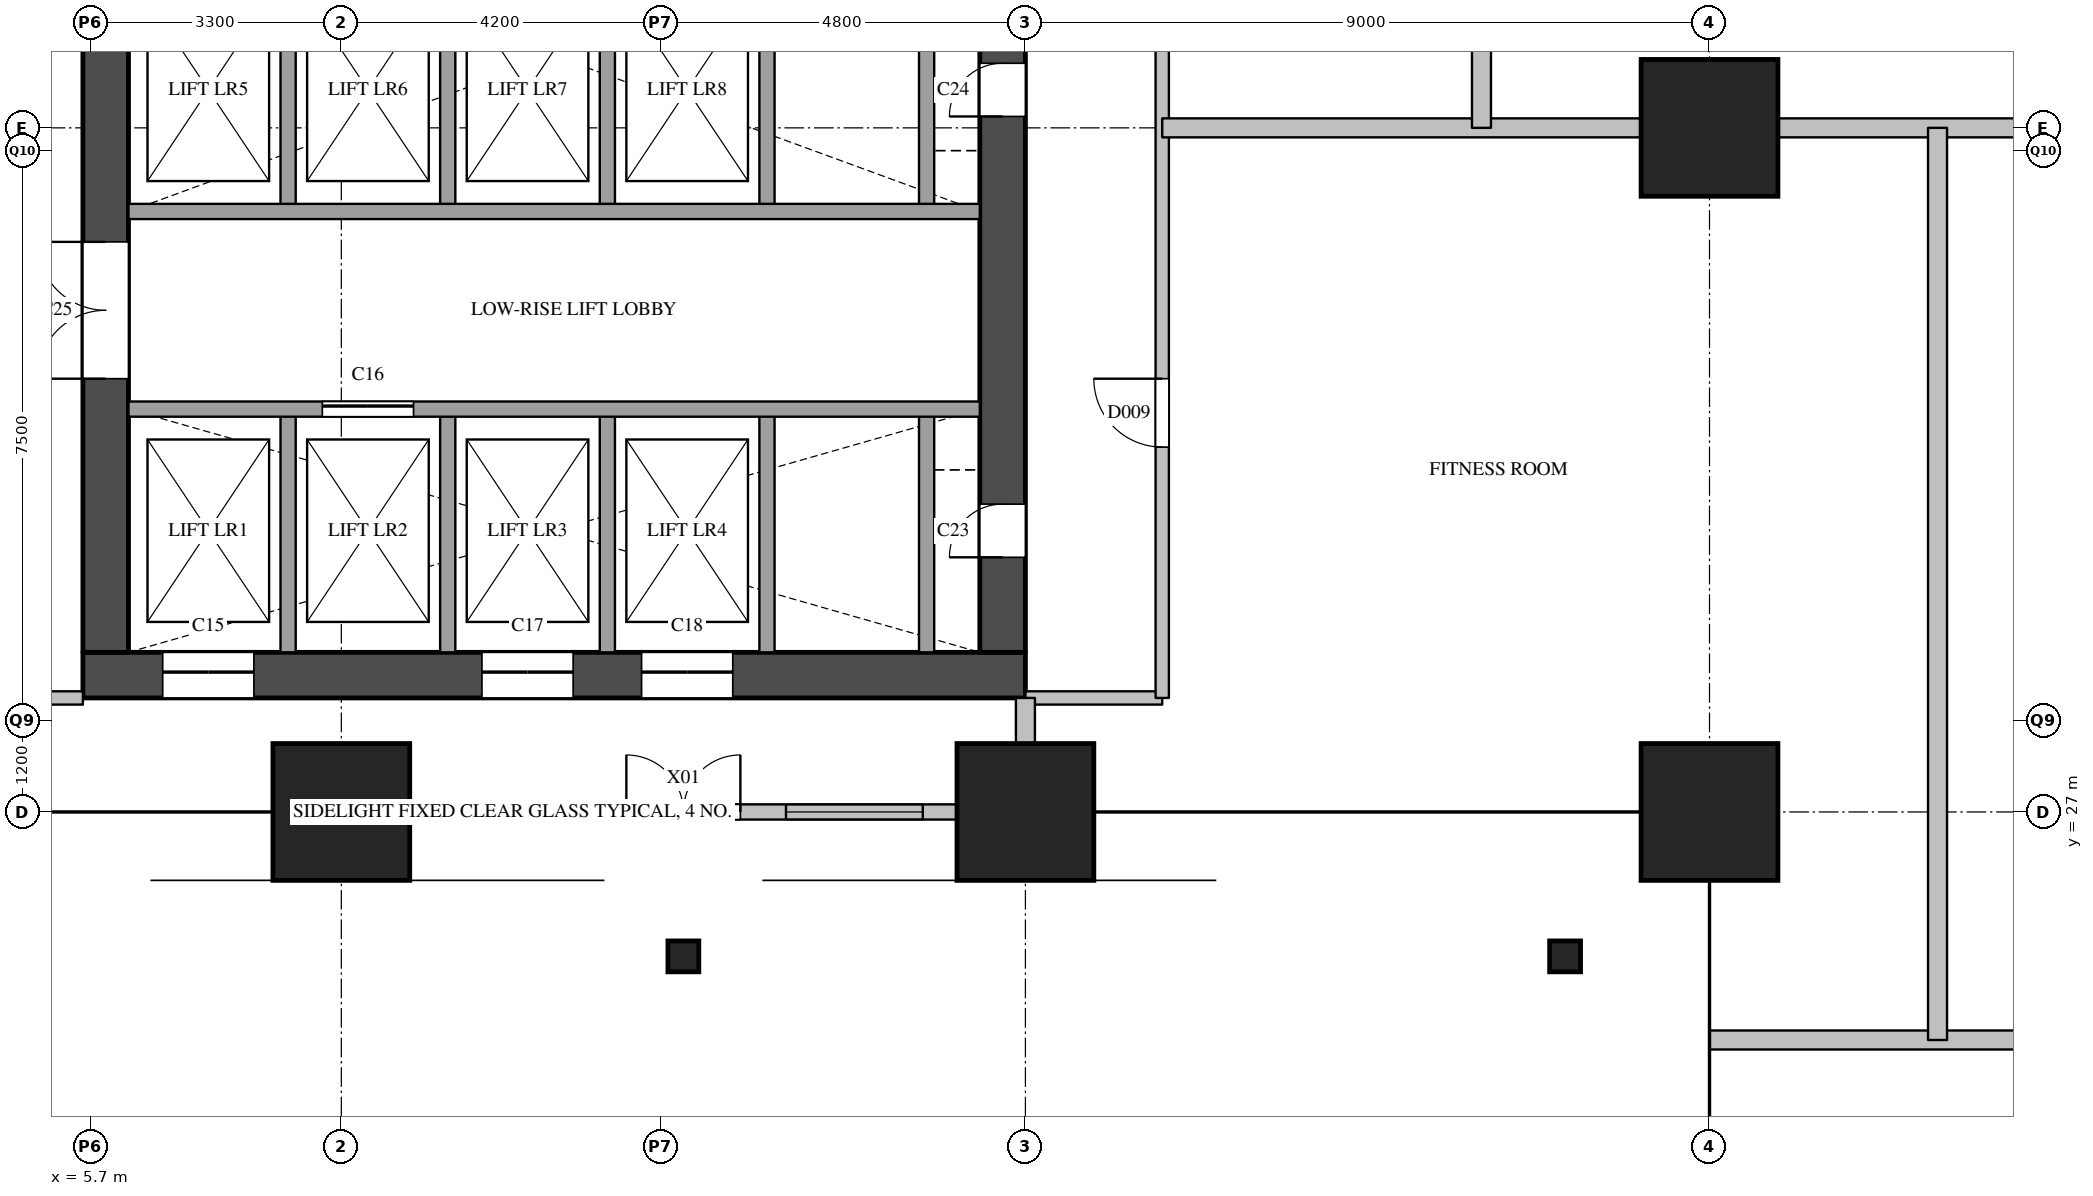
"""IFC4 building model, lengths in metres.
Left out: names, types, materials, properties, quantities, classifications, styles, units other than length and angle.
Written with IfcOpenShell. Run it as: python <this file> out.ifc"""

import sys

from ifc_helpers import new_model, si_unit, direction, frame, frame_2d, origin, origin_2d, place, context, subcontext, project, spatial, rectangle, hollow_rectangle, extrude, element, fill, save


model = new_model("IFC4")
c1 = context("Model", 3, precision=1e-05, world=origin(), true_north=direction((0.0, 1.0)))
c2 = subcontext(c1, "Body", "Model", "MODEL_VIEW")
j1 = project(units=[si_unit("LENGTHUNIT", "METRE"), si_unit("PLANEANGLEUNIT", "RADIAN")], contexts=[c1])
p1 = place(None, origin())
s1 = spatial("IfcSite", under=j1, at=p1, CompositionType="ELEMENT")
p2 = place(p1, origin())
s2 = spatial("IfcBuilding", under=s1, at=p2, CompositionType="ELEMENT")
p3 = place(p2, frame((0.0, 0.0, 77.8)))
s3 = spatial("IfcBuildingStorey", under=s2, at=p3, CompositionType="ELEMENT", Elevation=77.8)
for number, where, z_axis, x_axis in (
    (1, (9.0, 27.0, 0.0), (0.0, 0.0, 1.0), (1.0, 0.0, 0.0)),
    (2, (18.0, 27.0, 0.0), (0.0, 0.0, 1.0), (1.0, 0.0, 0.0)),
    (3, (27.0, 27.0, 0.0), (0.0, 0.0, 1.0), (1.0, 0.0, 0.0)),
    (4, (27.0, 36.0, 0.0), (0.0, 0.0, 1.0), (1.0, 0.0, 0.0)),
):
    element("IfcColumn", number, at=place(p3, frame(where, z_axis=z_axis, x_axis=x_axis)), inside=s3, PredefinedType="COLUMN", context=c2, shape_type="SweptSolid", body=[
        extrude(rectangle(XDim=1.8, YDim=1.8, at=origin_2d()), origin(), (0.0, 0.0, 1.0), 3.8),
    ])
for number, where, z_axis, x_axis in (
    (5, (13.5, 25.1, 0.0), (0.0, 0.0, 1.0), (1.0, 0.0, 0.0)),
    (6, (25.1, 25.1, 0.0), (0.0, 0.0, 1.0), (1.0, 0.0, 0.0)),
):
    element("IfcColumn", number, at=place(p3, frame(where, z_axis=z_axis, x_axis=x_axis)), inside=s3, PredefinedType="COLUMN", context=c2, shape_type="SweptSolid", body=[
        extrude(hollow_rectangle(XDim=0.406, YDim=0.406, WallThickness=0.015, at=origin_2d()), origin(), (0.0, 0.0, 1.0), 8.467),
    ])
p4 = place(p3, frame((9.9, 27.0, 0.0), z_axis=(0.0, 0.0, 1.0), x_axis=(1.0, 0.0, 0.0)))
e7 = element("IfcWall", 7, at=p4, inside=s3, PredefinedType="SOLIDWALL", context=c2, shape_type="SweptSolid", body=[
    extrude(rectangle(XDim=7.2, YDim=0.2, at=frame_2d((3.6, 0.0))), origin(), (0.0, 0.0, 1.0), 2.5),
])
p5 = place(p4, frame((2.85, 0.0, 0.0)))
e8 = element("IfcOpeningElement", 8, at=p5, cuts=e7, PredefinedType="OPENING", context=c2, shape_type="SweptSolid", body=[
    extrude(rectangle(XDim=1.5, YDim=2.1, at=frame_2d((0.75, 1.05))), frame((0.0, 0.11, 0.0), z_axis=(0.0, -1.0, 0.0), x_axis=(1.0, 0.0, 0.0)), (0.0, 0.0, 1.0), 0.22),
])
p6 = place(p4, frame((0.45, 0.0, 0.1)))
e9 = element("IfcOpeningElement", 9, at=p6, cuts=e7, PredefinedType="OPENING", context=c2, shape_type="SweptSolid", body=[
    extrude(rectangle(XDim=1.8, YDim=2.1, at=frame_2d((0.9, 1.05))), frame((0.0, 0.11, 0.0), z_axis=(0.0, -1.0, 0.0), x_axis=(1.0, 0.0, 0.0)), (0.0, 0.0, 1.0), 0.22),
])
p7 = place(p4, frame((4.95, 0.0, 0.1)))
e10 = element("IfcOpeningElement", 10, at=p7, cuts=e7, PredefinedType="OPENING", context=c2, shape_type="SweptSolid", body=[
    extrude(rectangle(XDim=1.8, YDim=2.1, at=frame_2d((0.9, 1.05))), frame((0.0, 0.11, 0.0), z_axis=(0.0, -1.0, 0.0), x_axis=(1.0, 0.0, 0.0)), (0.0, 0.0, 1.0), 0.22),
])
p8 = place(p3, frame((5.6, 28.8, 0.0), z_axis=(0.0, 0.0, 1.0), x_axis=(1.0, 0.0, 0.0)))
e11 = element("IfcWall", 11, at=p8, inside=s3, PredefinedType="SHEAR", context=c2, shape_type="SweptSolid", body=[
    extrude(rectangle(XDim=12.4, YDim=0.6, at=frame_2d((6.2, 0.0))), origin(), (0.0, 0.0, 1.0), 3.5),
])
p9 = place(p8, frame((1.05, 0.0, 0.0)))
e12 = element("IfcOpeningElement", 12, at=p9, cuts=e11, PredefinedType="OPENING", context=c2, shape_type="SweptSolid", body=[
    extrude(rectangle(XDim=1.2, YDim=2.1, at=frame_2d((0.6, 1.05))), frame((0.0, 0.31, 0.0), z_axis=(0.0, -1.0, 0.0), x_axis=(1.0, 0.0, 0.0)), (0.0, 0.0, 1.0), 0.62),
])
p10 = place(p8, frame((5.25, 0.0, 0.0)))
e13 = element("IfcOpeningElement", 13, at=p10, cuts=e11, PredefinedType="OPENING", context=c2, shape_type="SweptSolid", body=[
    extrude(rectangle(XDim=1.2, YDim=2.1, at=frame_2d((0.6, 1.05))), frame((0.0, 0.31, 0.0), z_axis=(0.0, -1.0, 0.0), x_axis=(1.0, 0.0, 0.0)), (0.0, 0.0, 1.0), 0.62),
])
p11 = place(p8, frame((7.35, 0.0, 0.0)))
e14 = element("IfcOpeningElement", 14, at=p11, cuts=e11, PredefinedType="OPENING", context=c2, shape_type="SweptSolid", body=[
    extrude(rectangle(XDim=1.2, YDim=2.1, at=frame_2d((0.6, 1.05))), frame((0.0, 0.31, 0.0), z_axis=(0.0, -1.0, 0.0), x_axis=(1.0, 0.0, 0.0)), (0.0, 0.0, 1.0), 0.62),
])
p12 = place(p3, frame((5.9, 29.1, 0.0), z_axis=(0.0, 0.0, 1.0), x_axis=(0.0, 1.0, 0.0)))
e15 = element("IfcWall", 15, at=p12, inside=s3, PredefinedType="SHEAR", context=c2, shape_type="SweptSolid", body=[
    extrude(rectangle(XDim=20.3, YDim=0.6, at=frame_2d((10.15, 0.0))), origin(), (0.0, 0.0, 1.0), 3.5),
])
p13 = place(p12, frame((3.6, 0.0, 0.0)))
e16 = element("IfcOpeningElement", 16, at=p13, cuts=e15, PredefinedType="OPENING", context=c2, shape_type="SweptSolid", body=[
    extrude(rectangle(XDim=1.8, YDim=2.1, at=frame_2d((0.9, 1.05))), frame((0.0, 0.31, 0.0), z_axis=(0.0, -1.0, 0.0), x_axis=(1.0, 0.0, 0.0)), (0.0, 0.0, 1.0), 0.62),
])
p14 = place(p12, frame((16.4, 0.0, 0.0)))
e17 = element("IfcOpeningElement", 17, at=p14, cuts=e15, PredefinedType="OPENING", context=c2, shape_type="SweptSolid", body=[
    extrude(rectangle(XDim=1.0, YDim=2.1, at=frame_2d((0.5, 1.05))), frame((0.0, 0.31, 0.0), z_axis=(0.0, -1.0, 0.0), x_axis=(1.0, 0.0, 0.0)), (0.0, 0.0, 1.0), 0.62),
])
p15 = place(p3, frame((17.7, 29.1, 0.0), z_axis=(0.0, 0.0, 1.0), x_axis=(0.0, 1.0, 0.0)))
e18 = element("IfcWall", 18, at=p15, inside=s3, PredefinedType="SHEAR", context=c2, shape_type="SweptSolid", body=[
    extrude(rectangle(XDim=20.3, YDim=0.6, at=frame_2d((10.15, 0.0))), origin(), (0.0, 0.0, 1.0), 3.5),
])
p16 = place(p15, frame((1.25, 0.0, 0.0)))
e19 = element("IfcOpeningElement", 19, at=p16, cuts=e18, PredefinedType="OPENING", context=c2, shape_type="SweptSolid", body=[
    extrude(rectangle(XDim=0.7, YDim=2.1, at=frame_2d((0.35, 1.05))), frame((0.0, 0.31, 0.0), z_axis=(0.0, -1.0, 0.0), x_axis=(1.0, 0.0, 0.0)), (0.0, 0.0, 1.0), 0.62),
])
p17 = place(p15, frame((7.05, 0.0, 0.0)))
e20 = element("IfcOpeningElement", 20, at=p17, cuts=e18, PredefinedType="OPENING", context=c2, shape_type="SweptSolid", body=[
    extrude(rectangle(XDim=0.7, YDim=2.1, at=frame_2d((0.35, 1.05))), frame((0.0, 0.31, 0.0), z_axis=(0.0, -1.0, 0.0), x_axis=(1.0, 0.0, 0.0)), (0.0, 0.0, 1.0), 0.62),
])
p18 = place(p3, frame((8.3, 29.1, 0.0), z_axis=(0.0, 0.0, 1.0), x_axis=(0.0, 1.0, 0.0)))
e21 = element("IfcWall", 21, at=p18, inside=s3, PredefinedType="SOLIDWALL", context=c2, shape_type="SweptSolid", body=[
    extrude(rectangle(XDim=3.2, YDim=0.2, at=frame_2d((1.6, 0.0))), origin(), (0.0, 0.0, 1.0), 3.5),
])
p19 = place(p3, frame((8.3, 34.9, 0.0), z_axis=(0.0, 0.0, 1.0), x_axis=(0.0, 1.0, 0.0)))
e22 = element("IfcWall", 22, at=p19, inside=s3, PredefinedType="SOLIDWALL", context=c2, shape_type="SweptSolid", body=[
    extrude(rectangle(XDim=3.2, YDim=0.2, at=frame_2d((1.6, 0.0))), origin(), (0.0, 0.0, 1.0), 3.5),
])
p20 = place(p3, frame((10.4, 29.1, 0.0), z_axis=(0.0, 0.0, 1.0), x_axis=(0.0, 1.0, 0.0)))
e23 = element("IfcWall", 23, at=p20, inside=s3, PredefinedType="SOLIDWALL", context=c2, shape_type="SweptSolid", body=[
    extrude(rectangle(XDim=3.2, YDim=0.2, at=frame_2d((1.6, 0.0))), origin(), (0.0, 0.0, 1.0), 3.5),
])
p21 = place(p3, frame((10.4, 34.9, 0.0), z_axis=(0.0, 0.0, 1.0), x_axis=(0.0, 1.0, 0.0)))
e24 = element("IfcWall", 24, at=p21, inside=s3, PredefinedType="SOLIDWALL", context=c2, shape_type="SweptSolid", body=[
    extrude(rectangle(XDim=3.2, YDim=0.2, at=frame_2d((1.6, 0.0))), origin(), (0.0, 0.0, 1.0), 3.5),
])
p22 = place(p3, frame((12.5, 29.1, 0.0), z_axis=(0.0, 0.0, 1.0), x_axis=(0.0, 1.0, 0.0)))
e25 = element("IfcWall", 25, at=p22, inside=s3, PredefinedType="SOLIDWALL", context=c2, shape_type="SweptSolid", body=[
    extrude(rectangle(XDim=3.2, YDim=0.2, at=frame_2d((1.6, 0.0))), origin(), (0.0, 0.0, 1.0), 3.5),
])
p23 = place(p3, frame((12.5, 34.9, 0.0), z_axis=(0.0, 0.0, 1.0), x_axis=(0.0, 1.0, 0.0)))
e26 = element("IfcWall", 26, at=p23, inside=s3, PredefinedType="SOLIDWALL", context=c2, shape_type="SweptSolid", body=[
    extrude(rectangle(XDim=3.2, YDim=0.2, at=frame_2d((1.6, 0.0))), origin(), (0.0, 0.0, 1.0), 3.5),
])
p24 = place(p3, frame((14.6, 29.1, 0.0), z_axis=(0.0, 0.0, 1.0), x_axis=(0.0, 1.0, 0.0)))
e27 = element("IfcWall", 27, at=p24, inside=s3, PredefinedType="SOLIDWALL", context=c2, shape_type="SweptSolid", body=[
    extrude(rectangle(XDim=3.2, YDim=0.2, at=frame_2d((1.6, 0.0))), origin(), (0.0, 0.0, 1.0), 3.5),
])
p25 = place(p3, frame((14.6, 34.9, 0.0), z_axis=(0.0, 0.0, 1.0), x_axis=(0.0, 1.0, 0.0)))
e28 = element("IfcWall", 28, at=p25, inside=s3, PredefinedType="SOLIDWALL", context=c2, shape_type="SweptSolid", body=[
    extrude(rectangle(XDim=3.2, YDim=0.2, at=frame_2d((1.6, 0.0))), origin(), (0.0, 0.0, 1.0), 3.5),
])
p26 = place(p3, frame((16.7, 29.1, 0.0), z_axis=(0.0, 0.0, 1.0), x_axis=(0.0, 1.0, 0.0)))
e29 = element("IfcWall", 29, at=p26, inside=s3, PredefinedType="SOLIDWALL", context=c2, shape_type="SweptSolid", body=[
    extrude(rectangle(XDim=3.2, YDim=0.2, at=frame_2d((1.6, 0.0))), origin(), (0.0, 0.0, 1.0), 3.5),
])
p27 = place(p3, frame((16.7, 34.9, 0.0), z_axis=(0.0, 0.0, 1.0), x_axis=(0.0, 1.0, 0.0)))
e30 = element("IfcWall", 30, at=p27, inside=s3, PredefinedType="SOLIDWALL", context=c2, shape_type="SweptSolid", body=[
    extrude(rectangle(XDim=3.2, YDim=0.2, at=frame_2d((1.6, 0.0))), origin(), (0.0, 0.0, 1.0), 3.5),
])
p28 = place(p3, frame((6.2, 32.3, 0.0), z_axis=(0.0, 0.0, 1.0), x_axis=(1.0, 0.0, 0.0)))
e31 = element("IfcWall", 31, at=p28, inside=s3, PredefinedType="SOLIDWALL", context=c2, shape_type="SweptSolid", body=[
    extrude(rectangle(XDim=11.2, YDim=0.2, at=frame_2d((5.6, 0.0))), origin(), (0.0, 0.0, 1.0), 3.5),
])
p29 = place(p28, frame((2.55, 0.0, 0.0)))
e32 = element("IfcOpeningElement", 32, at=p29, cuts=e31, PredefinedType="OPENING", context=c2, shape_type="SweptSolid", body=[
    extrude(rectangle(XDim=1.2, YDim=2.1, at=frame_2d((0.6, 1.05))), frame((0.0, 0.11, 0.0), z_axis=(0.0, -1.0, 0.0), x_axis=(1.0, 0.0, 0.0)), (0.0, 0.0, 1.0), 0.22),
])
p30 = place(p3, frame((6.2, 34.9, 0.0), z_axis=(0.0, 0.0, 1.0), x_axis=(1.0, 0.0, 0.0)))
e33 = element("IfcWall", 33, at=p30, inside=s3, PredefinedType="SOLIDWALL", context=c2, shape_type="SweptSolid", body=[
    extrude(rectangle(XDim=11.2, YDim=0.2, at=frame_2d((5.6, 0.0))), origin(), (0.0, 0.0, 1.0), 3.5),
])
for number, where, z_axis, x_axis in (
    (34, (3.8, 28.5, 0.0), (0.0, 0.0, 1.0), (1.0, 0.0, 0.0)),
    (35, (18.0, 28.5, 0.0), (0.0, 0.0, 1.0), (1.0, 0.0, 0.0)),
):
    element("IfcWall", number, at=place(p3, frame(where, z_axis=z_axis, x_axis=x_axis)), inside=s3, PredefinedType="PARTITIONING", context=c2, shape_type="SweptSolid", body=[
        extrude(rectangle(XDim=1.8, YDim=0.175, at=frame_2d((0.9, 0.0))), origin(), (0.0, 0.0, 1.0), 3.5),
    ])
p31 = place(p3, frame((19.8, 28.5, 0.0), z_axis=(0.0, 0.0, 1.0), x_axis=(0.0, 1.0, 0.0)))
e36 = element("IfcWall", 36, at=p31, inside=s3, PredefinedType="PARTITIONING", context=c2, shape_type="SweptSolid", body=[
    extrude(rectangle(XDim=23.3, YDim=0.175, at=frame_2d((11.65, 0.0))), origin(), (0.0, 0.0, 1.0), 3.5),
])
p32 = place(p31, frame((3.3, 0.0, 0.0)))
e37 = element("IfcOpeningElement", 37, at=p32, cuts=e36, PredefinedType="OPENING", context=c2, shape_type="SweptSolid", body=[
    extrude(rectangle(XDim=0.9, YDim=2.1, at=frame_2d((0.45, 1.05))), frame((0.0, 0.097, 0.0), z_axis=(0.0, -1.0, 0.0), x_axis=(1.0, 0.0, 0.0)), (0.0, 0.0, 1.0), 0.195),
])
p33 = place(p31, frame((14.95, 0.0, 0.0)))
e38 = element("IfcOpeningElement", 38, at=p33, cuts=e36, PredefinedType="OPENING", context=c2, shape_type="SweptSolid", body=[
    extrude(rectangle(XDim=0.9, YDim=2.1, at=frame_2d((0.45, 1.05))), frame((0.0, 0.097, 0.0), z_axis=(0.0, -1.0, 0.0), x_axis=(1.0, 0.0, 0.0)), (0.0, 0.0, 1.0), 0.195),
])
p34 = place(p3, frame((27.0, 24.0, 0.0), z_axis=(0.0, 0.0, 1.0), x_axis=(1.0, 0.0, 0.0)))
e39 = element("IfcWall", 39, at=p34, inside=s3, PredefinedType="PARTITIONING", context=c2, shape_type="SweptSolid", body=[
    extrude(rectangle(XDim=7.071, YDim=0.25, at=frame_2d((3.535, 0.0))), origin(), (0.0, 0.0, 1.0), 2.5),
])
p35 = place(p3, frame((19.8, 36.0, 0.0), z_axis=(0.0, 0.0, 1.0), x_axis=(1.0, 0.0, 0.0)))
e40 = element("IfcWall", 40, at=p35, inside=s3, PredefinedType="PARTITIONING", context=c2, shape_type="SweptSolid", body=[
    extrude(rectangle(XDim=14.4, YDim=0.25, at=frame_2d((7.2, 0.0))), origin(), (0.0, 0.0, 1.0), 3.5),
])
p36 = place(p3, frame((18.0, 27.0, 0.0), z_axis=(0.0, 0.0, 1.0), x_axis=(0.0, 1.0, 0.0)))
e41 = element("IfcWall", 41, at=p36, inside=s3, PredefinedType="PARTITIONING", context=c2, shape_type="SweptSolid", body=[
    extrude(rectangle(XDim=1.5, YDim=0.25, at=frame_2d((0.75, 0.0))), origin(), (0.0, 0.0, 1.0), 3.5),
])
p37 = place(p3, frame((24.0, 36.0, 0.0), z_axis=(0.0, 0.0, 1.0), x_axis=(0.0, 1.0, 0.0)))
e42 = element("IfcWall", 42, at=p37, inside=s3, PredefinedType="PARTITIONING", context=c2, shape_type="SweptSolid", body=[
    extrude(rectangle(XDim=18.0, YDim=0.25, at=frame_2d((9.0, 0.0))), origin(), (0.0, 0.0, 1.0), 2.5),
])
p38 = place(p3, frame((30.0, 24.0, 0.0), z_axis=(0.0, 0.0, 1.0), x_axis=(0.0, 1.0, 0.0)))
e43 = element("IfcWall", 43, at=p38, inside=s3, PredefinedType="PARTITIONING", context=c2, shape_type="SweptSolid", body=[
    extrude(rectangle(XDim=12.0, YDim=0.25, at=frame_2d((6.0, 0.0))), origin(), (0.0, 0.0, 1.0), 2.5),
])
p39 = place(p5, origin())
e44 = element("IfcDoor", 44, at=p39, inside=s3, OperationType="DOUBLE_DOOR_SINGLE_SWING", PredefinedType="DOOR", context=c2, shape_type="SweptSolid", body=[
    extrude(rectangle(XDim=1.5, YDim=2.1, at=frame_2d((0.75, 1.05))), frame((0.0, 0.025, 0.0), z_axis=(0.0, -1.0, 0.0), x_axis=(1.0, 0.0, 0.0)), (0.0, 0.0, 1.0), 0.05),
])
fill(e8, e44)
p40 = place(p6, origin())
e45 = element("IfcWindow", 45, at=p40, inside=s3, PartitioningType="SINGLE_PANEL", PredefinedType="WINDOW", context=c2, shape_type="SweptSolid", body=[
    extrude(rectangle(XDim=1.8, YDim=2.1, at=frame_2d((0.9, 1.05))), frame((0.0, 0.03, 0.0), z_axis=(0.0, -1.0, 0.0), x_axis=(1.0, 0.0, 0.0)), (0.0, 0.0, 1.0), 0.06),
])
fill(e9, e45)
p41 = place(p7, origin())
e46 = element("IfcWindow", 46, at=p41, inside=s3, PartitioningType="SINGLE_PANEL", PredefinedType="WINDOW", context=c2, shape_type="SweptSolid", body=[
    extrude(rectangle(XDim=1.8, YDim=2.1, at=frame_2d((0.9, 1.05))), frame((0.0, 0.03, 0.0), z_axis=(0.0, -1.0, 0.0), x_axis=(1.0, 0.0, 0.0)), (0.0, 0.0, 1.0), 0.06),
])
fill(e10, e46)
p42 = place(p9, origin())
e47 = element("IfcDoor", 47, at=p42, inside=s3, OperationType="SLIDING_TO_LEFT", PredefinedType="DOOR", context=c2, shape_type="SweptSolid", body=[
    extrude(rectangle(XDim=1.2, YDim=2.1, at=frame_2d((0.6, 1.05))), frame((0.0, 0.025, 0.0), z_axis=(0.0, -1.0, 0.0), x_axis=(1.0, 0.0, 0.0)), (0.0, 0.0, 1.0), 0.05),
])
fill(e12, e47)
p43 = place(p29, origin())
e48 = element("IfcDoor", 48, at=p43, inside=s3, OperationType="SLIDING_TO_LEFT", PredefinedType="DOOR", context=c2, shape_type="SweptSolid", body=[
    extrude(rectangle(XDim=1.2, YDim=2.1, at=frame_2d((0.6, 1.05))), frame((0.0, 0.025, 0.0), z_axis=(0.0, -1.0, 0.0), x_axis=(1.0, 0.0, 0.0)), (0.0, 0.0, 1.0), 0.05),
])
fill(e32, e48)
p44 = place(p10, origin())
e49 = element("IfcDoor", 49, at=p44, inside=s3, OperationType="SLIDING_TO_LEFT", PredefinedType="DOOR", context=c2, shape_type="SweptSolid", body=[
    extrude(rectangle(XDim=1.2, YDim=2.1, at=frame_2d((0.6, 1.05))), frame((0.0, 0.025, 0.0), z_axis=(0.0, -1.0, 0.0), x_axis=(1.0, 0.0, 0.0)), (0.0, 0.0, 1.0), 0.05),
])
fill(e13, e49)
p45 = place(p11, origin())
e50 = element("IfcDoor", 50, at=p45, inside=s3, OperationType="SLIDING_TO_LEFT", PredefinedType="DOOR", context=c2, shape_type="SweptSolid", body=[
    extrude(rectangle(XDim=1.2, YDim=2.1, at=frame_2d((0.6, 1.05))), frame((0.0, 0.025, 0.0), z_axis=(0.0, -1.0, 0.0), x_axis=(1.0, 0.0, 0.0)), (0.0, 0.0, 1.0), 0.05),
])
fill(e14, e50)
p46 = place(p16, origin())
e51 = element("IfcDoor", 51, at=p46, inside=s3, OperationType="SINGLE_SWING_LEFT", PredefinedType="DOOR", context=c2, shape_type="SweptSolid", body=[
    extrude(rectangle(XDim=0.7, YDim=2.1, at=frame_2d((0.35, 1.05))), frame((0.0, 0.025, 0.0), z_axis=(0.0, -1.0, 0.0), x_axis=(1.0, 0.0, 0.0)), (0.0, 0.0, 1.0), 0.05),
])
fill(e19, e51)
p47 = place(p17, origin())
e52 = element("IfcDoor", 52, at=p47, inside=s3, OperationType="SINGLE_SWING_LEFT", PredefinedType="DOOR", context=c2, shape_type="SweptSolid", body=[
    extrude(rectangle(XDim=0.7, YDim=2.1, at=frame_2d((0.35, 1.05))), frame((0.0, 0.025, 0.0), z_axis=(0.0, -1.0, 0.0), x_axis=(1.0, 0.0, 0.0)), (0.0, 0.0, 1.0), 0.05),
])
fill(e20, e52)
p48 = place(p13, origin())
e53 = element("IfcDoor", 53, at=p48, inside=s3, OperationType="DOUBLE_DOOR_SINGLE_SWING", PredefinedType="DOOR", context=c2, shape_type="SweptSolid", body=[
    extrude(rectangle(XDim=1.8, YDim=2.1, at=frame_2d((0.9, 1.05))), frame((0.0, 0.025, 0.0), z_axis=(0.0, -1.0, 0.0), x_axis=(1.0, 0.0, 0.0)), (0.0, 0.0, 1.0), 0.05),
])
fill(e16, e53)
p49 = place(p32, origin())
e54 = element("IfcDoor", 54, at=p49, inside=s3, OperationType="SINGLE_SWING_RIGHT", PredefinedType="DOOR", context=c2, shape_type="SweptSolid", body=[
    extrude(rectangle(XDim=0.9, YDim=2.1, at=frame_2d((0.45, 1.05))), frame((0.0, 0.025, 0.0), z_axis=(0.0, -1.0, 0.0), x_axis=(1.0, 0.0, 0.0)), (0.0, 0.0, 1.0), 0.05),
])
fill(e37, e54)
save(model, sys.argv[1])
